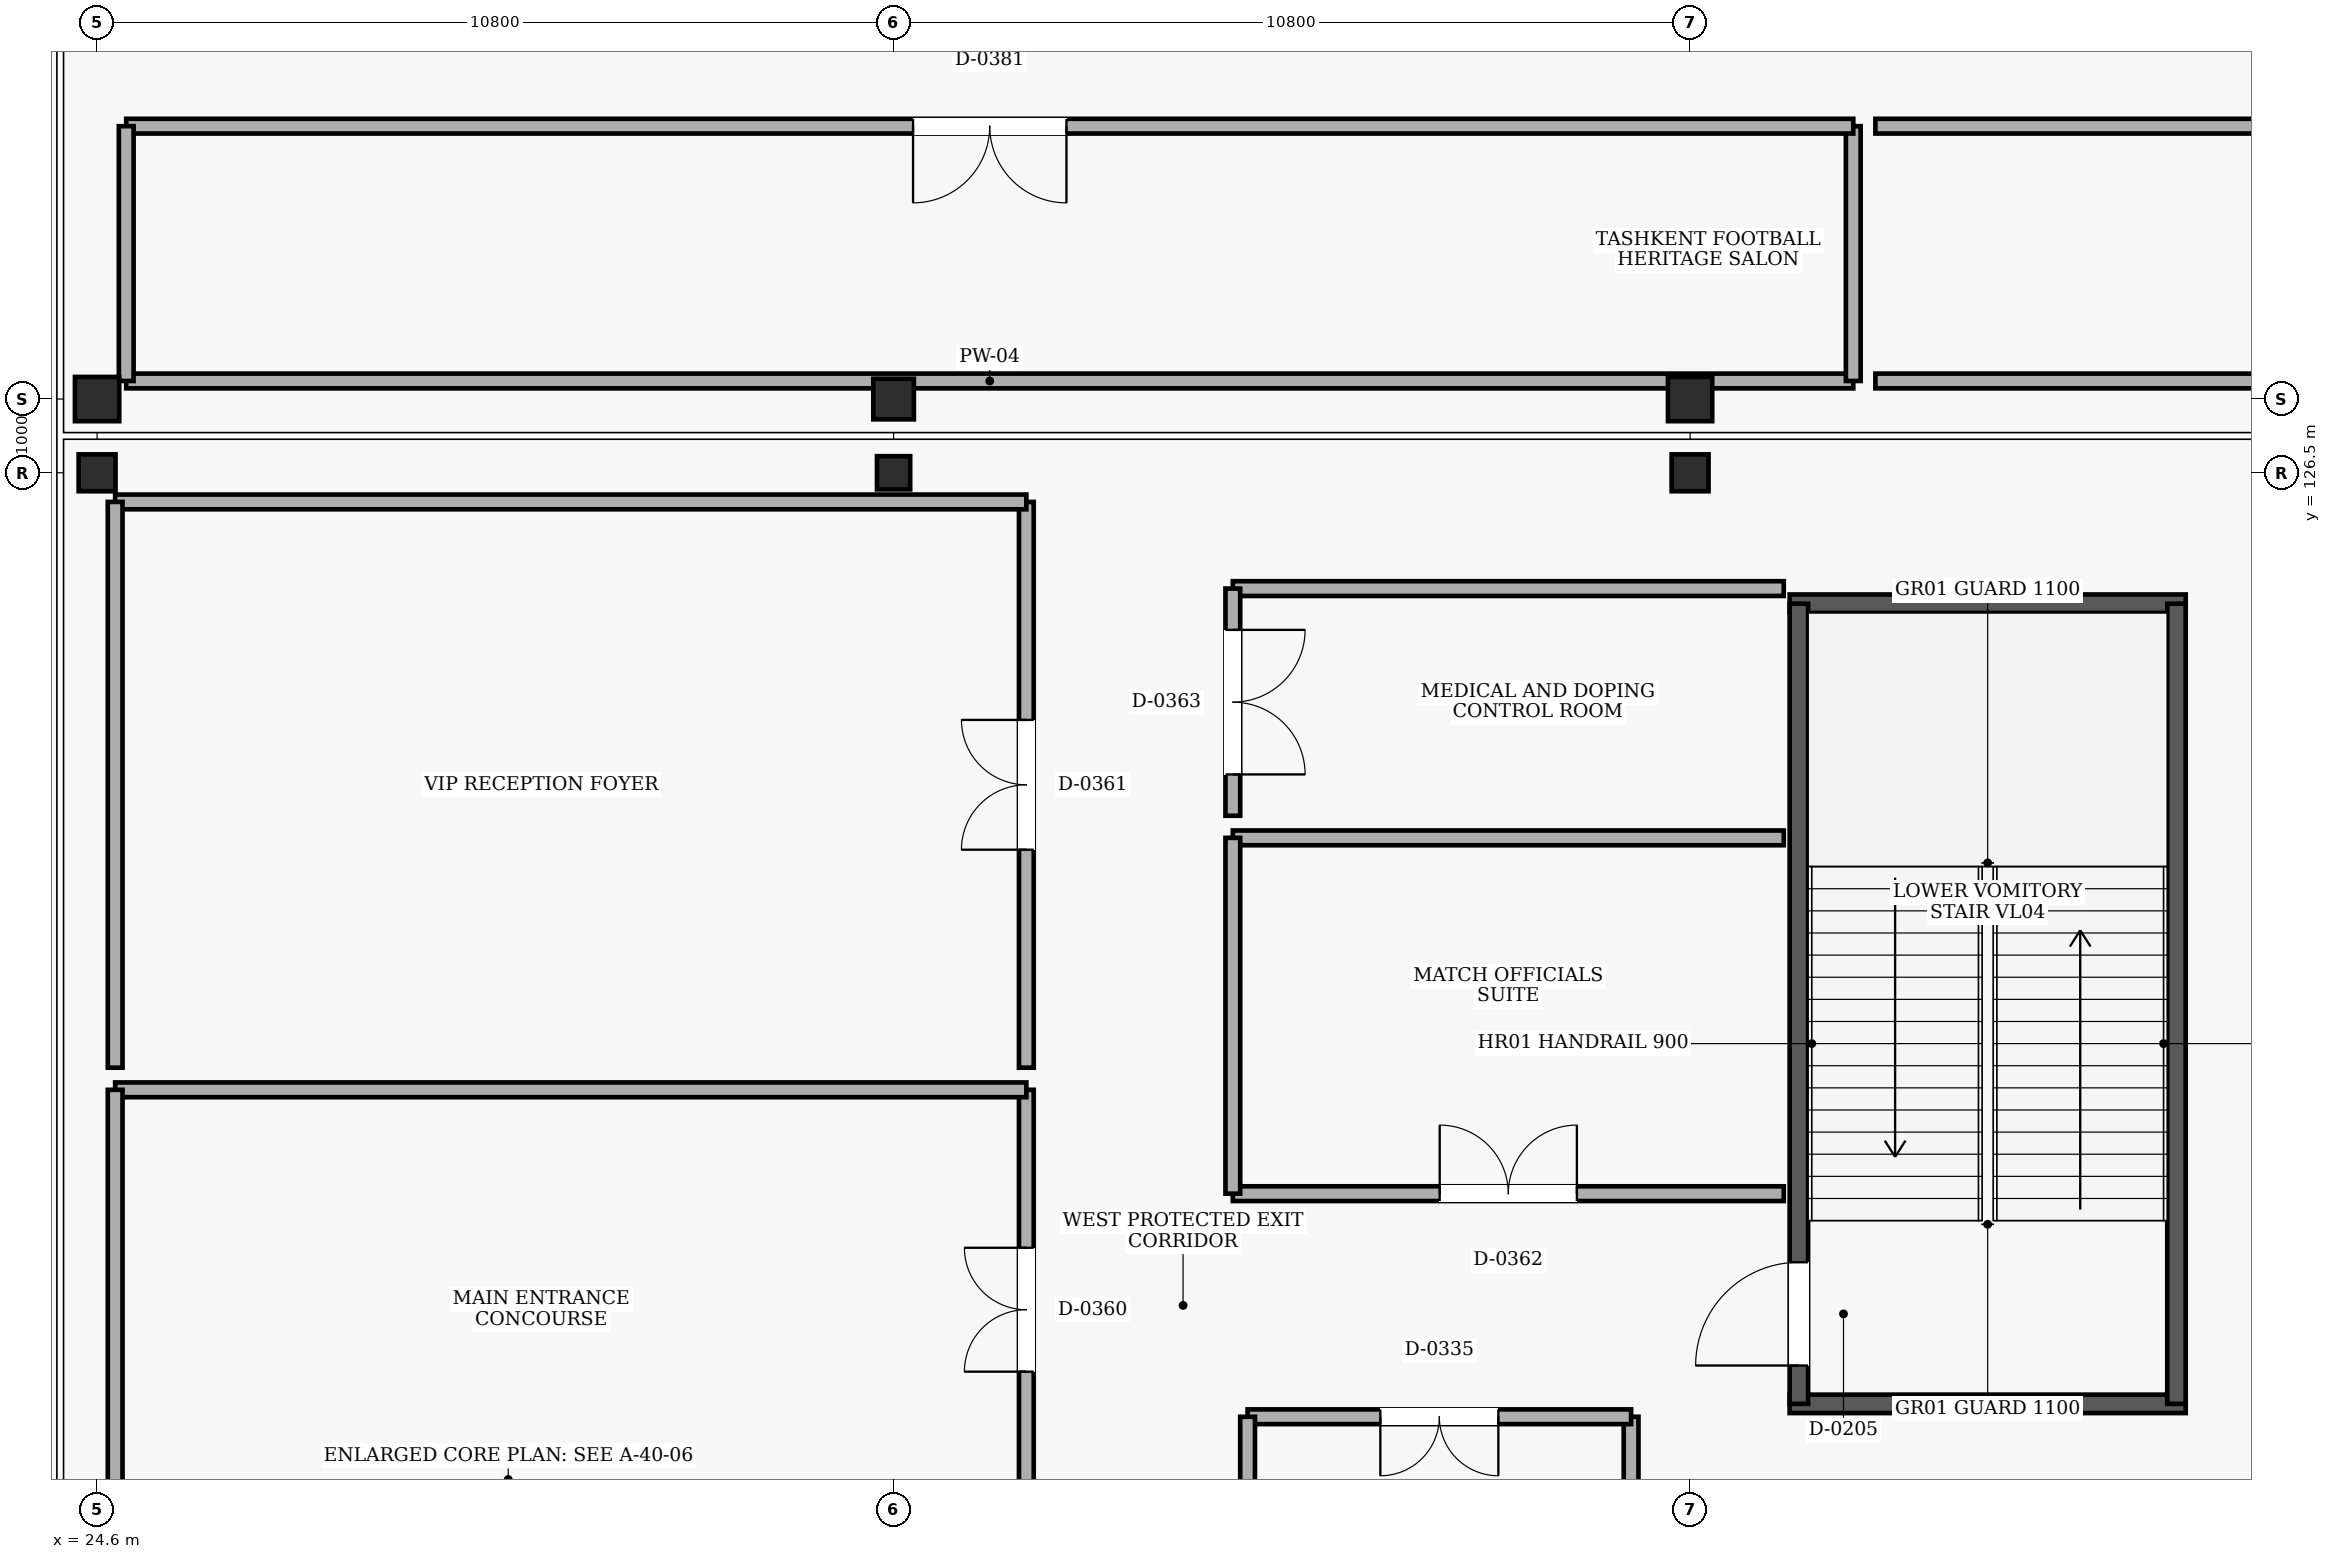
"""IFC4 building model, lengths in metres.
Left out: names, types, materials, properties, quantities, classifications, styles, units other than length and angle.
Written with IfcOpenShell. Run it as: python <this file> out.ifc"""

import sys

from ifc_helpers import new_model, si_unit, direction, frame, frame_2d, origin, origin_2d, place, context, subcontext, project, spatial, rectangle, extrude, element, fill, save


model = new_model("IFC4")
c1 = context("Model", 3, precision=1e-05, world=origin(), true_north=direction((0.0, 1.0)))
c2 = subcontext(c1, "Body", "Model", "MODEL_VIEW")
j1 = project(units=[si_unit("LENGTHUNIT", "METRE"), si_unit("PLANEANGLEUNIT", "RADIAN")], contexts=[c1])
p1 = place(None, origin())
s1 = spatial("IfcSite", under=j1, at=p1, CompositionType="ELEMENT")
p2 = place(p1, origin())
s2 = spatial("IfcBuilding", under=s1, at=p2, CompositionType="ELEMENT")
p3 = place(p2, origin())
s3 = spatial("IfcBuildingStorey", under=s2, at=p3, CompositionType="ELEMENT", Elevation=0.0)
p4 = place(p3, frame((24.6, 126.5, 0.0), z_axis=(0.0, 0.0, 1.0), x_axis=(1.0, 0.0, 0.0)))
e1 = element("IfcColumn", 1, at=p4, inside=s3, PredefinedType="COLUMN", context=c2, shape_type="SweptSolid", body=[
    extrude(rectangle(XDim=0.5, YDim=0.5, at=origin_2d()), origin(), (0.0, 0.0, 1.0), 5.4),
])
p5 = place(p3, frame((24.6, 127.5, 0.0), z_axis=(0.0, 0.0, 1.0), x_axis=(1.0, 0.0, 0.0)))
e2 = element("IfcColumn", 2, at=p5, inside=s3, PredefinedType="COLUMN", context=c2, shape_type="SweptSolid", body=[
    extrude(rectangle(XDim=0.6, YDim=0.6, at=origin_2d()), origin(), (0.0, 0.0, 1.0), 5.4),
])
p6 = place(p3, frame((35.4, 126.5, 0.0), z_axis=(0.0, 0.0, 1.0), x_axis=(1.0, 0.0, 0.0)))
e3 = element("IfcColumn", 3, at=p6, inside=s3, PredefinedType="COLUMN", context=c2, shape_type="SweptSolid", body=[
    extrude(rectangle(XDim=0.45, YDim=0.45, at=origin_2d()), origin(), (0.0, 0.0, 1.0), 5.4),
])
p7 = place(p3, frame((35.4, 127.5, 0.0), z_axis=(0.0, 0.0, 1.0), x_axis=(1.0, 0.0, 0.0)))
e4 = element("IfcColumn", 4, at=p7, inside=s3, PredefinedType="COLUMN", context=c2, shape_type="SweptSolid", body=[
    extrude(rectangle(XDim=0.55, YDim=0.55, at=origin_2d()), origin(), (0.0, 0.0, 1.0), 5.4),
])
p8 = place(p3, frame((46.2, 126.5, 0.0), z_axis=(0.0, 0.0, 1.0), x_axis=(1.0, 0.0, 0.0)))
e5 = element("IfcColumn", 5, at=p8, inside=s3, PredefinedType="COLUMN", context=c2, shape_type="SweptSolid", body=[
    extrude(rectangle(XDim=0.5, YDim=0.5, at=origin_2d()), origin(), (0.0, 0.0, 1.0), 5.4),
])
p9 = place(p3, frame((46.2, 127.5, 0.0), z_axis=(0.0, 0.0, 1.0), x_axis=(1.0, 0.0, 0.0)))
e6 = element("IfcColumn", 6, at=p9, inside=s3, PredefinedType="COLUMN", context=c2, shape_type="SweptSolid", body=[
    extrude(rectangle(XDim=0.6, YDim=0.6, at=origin_2d()), origin(), (0.0, 0.0, 1.0), 5.4),
])
for number, where, z_axis, x_axis in (
    (7, (47.55, 113.875, 0.0), (0.0, 0.0, 1.0), (1.0, 0.0, 0.0)),
    (8, (52.92, 124.725, 0.0), (0.0, 0.0, 1.0), (-1.0, 0.0, 0.0)),
):
    element("IfcWall", number, at=place(p3, frame(where, z_axis=z_axis, x_axis=x_axis)), inside=s3, PredefinedType="SHEAR", context=c2, shape_type="SweptSolid", body=[
        extrude(rectangle(XDim=5.37, YDim=0.25, at=frame_2d((2.685, 0.0))), origin(), (0.0, 0.0, 1.0), 5.08),
    ])
p10 = place(p3, frame((47.675, 113.875, 0.0), z_axis=(0.0, 0.0, 1.0), x_axis=(0.0, 1.0, 0.0)))
e9 = element("IfcWall", 9, at=p10, inside=s3, PredefinedType="SHEAR", context=c2, shape_type="SweptSolid", body=[
    extrude(rectangle(XDim=10.85, YDim=0.25, at=frame_2d((5.425, 0.0))), origin(), (0.0, 0.0, 1.0), 5.08),
])
p11 = place(p10, frame((0.52, 0.0, 0.0)))
e10 = element("IfcOpeningElement", 10, at=p11, cuts=e9, PredefinedType="OPENING", context=c2, shape_type="SweptSolid", body=[
    extrude(rectangle(XDim=1.4, YDim=2.15, at=frame_2d((0.7, 1.075))), frame((0.0, 0.135, 0.0), z_axis=(0.0, -1.0, 0.0), x_axis=(1.0, 0.0, 0.0)), (0.0, 0.0, 1.0), 0.27),
])
p12 = place(p3, frame((52.795, 113.875, 0.0), z_axis=(0.0, 0.0, 1.0), x_axis=(0.0, 1.0, 0.0)))
e11 = element("IfcWall", 11, at=p12, inside=s3, PredefinedType="SHEAR", context=c2, shape_type="SweptSolid", body=[
    extrude(rectangle(XDim=10.85, YDim=0.25, at=frame_2d((5.425, 0.0))), origin(), (0.0, 0.0, 1.0), 5.08),
])
p13 = place(p3, frame((45.4, 110.6, 0.0), z_axis=(0.0, 0.0, 1.0), x_axis=(0.0, 1.0, 0.0)))
e12 = element("IfcWall", 12, at=p13, inside=s3, PredefinedType="PARTITIONING", context=c2, shape_type="SweptSolid", body=[
    extrude(rectangle(XDim=3.1, YDim=0.2, at=frame_2d((1.55, 0.0))), origin(), (0.0, 0.0, 1.0), 5.08),
])
p14 = place(p3, frame((45.4, 113.7, 0.0), z_axis=(0.0, 0.0, 1.0), x_axis=(-1.0, 0.0, 0.0)))
e13 = element("IfcWall", 13, at=p14, inside=s3, PredefinedType="PARTITIONING", context=c2, shape_type="SweptSolid", body=[
    extrude(rectangle(XDim=5.2, YDim=0.2, at=frame_2d((2.6, 0.0))), origin(), (0.0, 0.0, 1.0), 5.08),
])
p15 = place(p14, frame((1.8, 0.0, 0.0)))
e14 = element("IfcOpeningElement", 14, at=p15, cuts=e13, PredefinedType="OPENING", context=c2, shape_type="SweptSolid", body=[
    extrude(rectangle(XDim=1.6, YDim=2.2, at=frame_2d((0.8, 1.1))), frame((0.0, 0.11, 0.0), z_axis=(0.0, -1.0, 0.0), x_axis=(1.0, 0.0, 0.0)), (0.0, 0.0, 1.0), 0.22),
])
p16 = place(p3, frame((40.2, 113.7, 0.0), z_axis=(0.0, 0.0, 1.0), x_axis=(0.0, -1.0, 0.0)))
e15 = element("IfcWall", 15, at=p16, inside=s3, PredefinedType="PARTITIONING", context=c2, shape_type="SweptSolid", body=[
    extrude(rectangle(XDim=3.1, YDim=0.2, at=frame_2d((1.55, 0.0))), origin(), (0.0, 0.0, 1.0), 5.08),
])
p17 = place(p3, frame((37.2, 112.17, 0.0), z_axis=(0.0, 0.0, 1.0), x_axis=(0.0, 1.0, 0.0)))
e16 = element("IfcWall", 16, at=p17, inside=s3, PredefinedType="PARTITIONING", context=c2, shape_type="SweptSolid", body=[
    extrude(rectangle(XDim=5.963, YDim=0.2, at=frame_2d((2.982, 0.0))), origin(), (0.0, 0.0, 1.0), 5.08),
])
p18 = place(p17, frame((2.142, 0.0, 0.0)))
e17 = element("IfcOpeningElement", 17, at=p18, cuts=e16, PredefinedType="OPENING", context=c2, shape_type="SweptSolid", body=[
    extrude(rectangle(XDim=1.68, YDim=2.25, at=frame_2d((0.84, 1.125))), frame((0.0, 0.11, 0.0), z_axis=(0.0, -1.0, 0.0), x_axis=(1.0, 0.0, 0.0)), (0.0, 0.0, 1.0), 0.22),
])
p19 = place(p3, frame((37.2, 118.133, 0.0), z_axis=(0.0, 0.0, 1.0), x_axis=(-1.0, 0.0, 0.0)))
e18 = element("IfcWall", 18, at=p19, inside=s3, PredefinedType="PARTITIONING", context=c2, shape_type="SweptSolid", body=[
    extrude(rectangle(XDim=12.355, YDim=0.2, at=frame_2d((6.177, 0.0))), origin(), (0.0, 0.0, 1.0), 5.08),
])
p20 = place(p3, frame((24.845, 118.133, 0.0), z_axis=(0.0, 0.0, 1.0), x_axis=(0.0, -1.0, 0.0)))
e19 = element("IfcWall", 19, at=p20, inside=s3, PredefinedType="PARTITIONING", context=c2, shape_type="SweptSolid", body=[
    extrude(rectangle(XDim=5.963, YDim=0.2, at=frame_2d((2.982, 0.0))), origin(), (0.0, 0.0, 1.0), 4.16),
])
p21 = place(p3, frame((37.2, 118.433, 0.0), z_axis=(0.0, 0.0, 1.0), x_axis=(0.0, 1.0, 0.0)))
e20 = element("IfcWall", 20, at=p21, inside=s3, PredefinedType="PARTITIONING", context=c2, shape_type="SweptSolid", body=[
    extrude(rectangle(XDim=7.672, YDim=0.2, at=frame_2d((3.836, 0.0))), origin(), (0.0, 0.0, 1.0), 5.08),
])
p22 = place(p21, frame((2.956, 0.0, 0.0)))
e21 = element("IfcOpeningElement", 21, at=p22, cuts=e20, PredefinedType="OPENING", context=c2, shape_type="SweptSolid", body=[
    extrude(rectangle(XDim=1.76, YDim=2.25, at=frame_2d((0.88, 1.125))), frame((0.0, 0.11, 0.0), z_axis=(0.0, -1.0, 0.0), x_axis=(1.0, 0.0, 0.0)), (0.0, 0.0, 1.0), 0.22),
])
p23 = place(p3, frame((37.2, 126.105, 0.0), z_axis=(0.0, 0.0, 1.0), x_axis=(-1.0, 0.0, 0.0)))
e22 = element("IfcWall", 22, at=p23, inside=s3, PredefinedType="PARTITIONING", context=c2, shape_type="SweptSolid", body=[
    extrude(rectangle(XDim=12.355, YDim=0.2, at=frame_2d((6.177, 0.0))), origin(), (0.0, 0.0, 1.0), 4.26),
])
p24 = place(p3, frame((24.845, 126.105, 0.0), z_axis=(0.0, 0.0, 1.0), x_axis=(0.0, -1.0, 0.0)))
e23 = element("IfcWall", 23, at=p24, inside=s3, PredefinedType="PARTITIONING", context=c2, shape_type="SweptSolid", body=[
    extrude(rectangle(XDim=7.672, YDim=0.2, at=frame_2d((3.836, 0.0))), origin(), (0.0, 0.0, 1.0), 4.16),
])
p25 = place(p3, frame((40.0, 116.725, 0.0), z_axis=(0.0, 0.0, 1.0), x_axis=(1.0, 0.0, 0.0)))
e24 = element("IfcWall", 24, at=p25, inside=s3, PredefinedType="PARTITIONING", context=c2, shape_type="SweptSolid", body=[
    extrude(rectangle(XDim=7.47, YDim=0.2, at=frame_2d((3.735, 0.0))), origin(), (0.0, 0.0, 1.0), 5.08),
])
p26 = place(p25, frame((2.805, 0.0, 0.0)))
e25 = element("IfcOpeningElement", 25, at=p26, cuts=e24, PredefinedType="OPENING", context=c2, shape_type="SweptSolid", body=[
    extrude(rectangle(XDim=1.86, YDim=2.3, at=frame_2d((0.93, 1.15))), frame((0.0, 0.11, 0.0), z_axis=(0.0, -1.0, 0.0), x_axis=(1.0, 0.0, 0.0)), (0.0, 0.0, 1.0), 0.22),
])
p27 = place(p3, frame((47.47, 121.55, 0.0), z_axis=(0.0, 0.0, 1.0), x_axis=(-1.0, 0.0, 0.0)))
e26 = element("IfcWall", 26, at=p27, inside=s3, PredefinedType="PARTITIONING", context=c2, shape_type="SweptSolid", body=[
    extrude(rectangle(XDim=7.47, YDim=0.2, at=frame_2d((3.735, 0.0))), origin(), (0.0, 0.0, 1.0), 5.08),
])
p28 = place(p3, frame((40.0, 121.55, 0.0), z_axis=(0.0, 0.0, 1.0), x_axis=(0.0, -1.0, 0.0)))
e27 = element("IfcWall", 27, at=p28, inside=s3, PredefinedType="PARTITIONING", context=c2, shape_type="SweptSolid", body=[
    extrude(rectangle(XDim=4.825, YDim=0.2, at=frame_2d((2.412, 0.0))), origin(), (0.0, 0.0, 1.0), 5.08),
])
p29 = place(p3, frame((47.47, 124.93, 0.0), z_axis=(0.0, 0.0, 1.0), x_axis=(-1.0, 0.0, 0.0)))
e28 = element("IfcWall", 28, at=p29, inside=s3, PredefinedType="PARTITIONING", context=c2, shape_type="SweptSolid", body=[
    extrude(rectangle(XDim=7.47, YDim=0.2, at=frame_2d((3.735, 0.0))), origin(), (0.0, 0.0, 1.0), 5.08),
])
p30 = place(p3, frame((40.0, 124.93, 0.0), z_axis=(0.0, 0.0, 1.0), x_axis=(0.0, -1.0, 0.0)))
e29 = element("IfcWall", 29, at=p30, inside=s3, PredefinedType="PARTITIONING", context=c2, shape_type="SweptSolid", body=[
    extrude(rectangle(XDim=3.08, YDim=0.2, at=frame_2d((1.54, 0.0))), origin(), (0.0, 0.0, 1.0), 5.08),
])
p31 = place(p30, frame((0.56, 0.0, 0.0)))
e30 = element("IfcOpeningElement", 30, at=p31, cuts=e29, PredefinedType="OPENING", context=c2, shape_type="SweptSolid", body=[
    extrude(rectangle(XDim=1.96, YDim=2.3, at=frame_2d((0.98, 1.15))), frame((0.0, 0.11, 0.0), z_axis=(0.0, -1.0, 0.0), x_axis=(1.0, 0.0, 0.0)), (0.0, 0.0, 1.0), 0.22),
])
p32 = place(p3, frame((24.995, 127.745, 0.0), z_axis=(0.0, 0.0, 1.0), x_axis=(1.0, 0.0, 0.0)))
e31 = element("IfcWall", 31, at=p32, inside=s3, PredefinedType="PARTITIONING", context=c2, shape_type="SweptSolid", body=[
    extrude(rectangle(XDim=23.417, YDim=0.2, at=frame_2d((11.709, 0.0))), origin(), (0.0, 0.0, 1.0), 4.26),
])
p33 = place(p3, frame((48.413, 127.745, 0.0), z_axis=(0.0, 0.0, 1.0), x_axis=(0.0, 1.0, 0.0)))
e32 = element("IfcWall", 32, at=p33, inside=s3, PredefinedType="PARTITIONING", context=c2, shape_type="SweptSolid", body=[
    extrude(rectangle(XDim=3.455, YDim=0.2, at=frame_2d((1.728, 0.0))), origin(), (0.0, 0.0, 1.0), 5.08),
])
p34 = place(p3, frame((48.413, 131.2, 0.0), z_axis=(0.0, 0.0, 1.0), x_axis=(-1.0, 0.0, 0.0)))
e33 = element("IfcWall", 33, at=p34, inside=s3, PredefinedType="PARTITIONING", context=c2, shape_type="SweptSolid", body=[
    extrude(rectangle(XDim=23.417, YDim=0.2, at=frame_2d((11.709, 0.0))), origin(), (0.0, 0.0, 1.0), 5.08),
])
p35 = place(p34, frame((10.669, 0.0, 0.0)))
e34 = element("IfcOpeningElement", 34, at=p35, cuts=e33, PredefinedType="OPENING", context=c2, shape_type="SweptSolid", body=[
    extrude(rectangle(XDim=2.08, YDim=2.35, at=frame_2d((1.04, 1.175))), frame((0.0, 0.11, 0.0), z_axis=(0.0, -1.0, 0.0), x_axis=(1.0, 0.0, 0.0)), (0.0, 0.0, 1.0), 0.22),
])
p36 = place(p3, frame((24.995, 131.2, 0.0), z_axis=(0.0, 0.0, 1.0), x_axis=(0.0, -1.0, 0.0)))
e35 = element("IfcWall", 35, at=p36, inside=s3, PredefinedType="PARTITIONING", context=c2, shape_type="SweptSolid", body=[
    extrude(rectangle(XDim=3.455, YDim=0.2, at=frame_2d((1.728, 0.0))), origin(), (0.0, 0.0, 1.0), 4.46),
])
p37 = place(p3, frame((48.712, 127.745, 0.0), z_axis=(0.0, 0.0, 1.0), x_axis=(1.0, 0.0, 0.0)))
e36 = element("IfcWall", 36, at=p37, inside=s3, PredefinedType="PARTITIONING", context=c2, shape_type="SweptSolid", body=[
    extrude(rectangle(XDim=23.417, YDim=0.2, at=frame_2d((11.709, 0.0))), origin(), (0.0, 0.0, 1.0), 4.21),
])
p38 = place(p3, frame((72.13, 131.2, 0.0), z_axis=(0.0, 0.0, 1.0), x_axis=(-1.0, 0.0, 0.0)))
e37 = element("IfcWall", 37, at=p38, inside=s3, PredefinedType="PARTITIONING", context=c2, shape_type="SweptSolid", body=[
    extrude(rectangle(XDim=23.417, YDim=0.2, at=frame_2d((11.709, 0.0))), origin(), (0.0, 0.0, 1.0), 5.08),
])
p39 = place(p38, frame((10.629, 0.0, 0.0)))
e38 = element("IfcOpeningElement", 38, at=p39, cuts=e37, PredefinedType="OPENING", context=c2, shape_type="SweptSolid", body=[
    extrude(rectangle(XDim=2.16, YDim=2.35, at=frame_2d((1.08, 1.175))), frame((0.0, 0.11, 0.0), z_axis=(0.0, -1.0, 0.0), x_axis=(1.0, 0.0, 0.0)), (0.0, 0.0, 1.0), 0.22),
])
p40 = place(p11, origin())
e39 = element("IfcDoor", 39, at=p40, inside=s3, OperationType="SINGLE_SWING_LEFT", PredefinedType="DOOR", context=c2, shape_type="SweptSolid", body=[
    extrude(rectangle(XDim=1.4, YDim=2.15, at=frame_2d((0.7, 1.075))), frame((0.0, 0.025, 0.0), z_axis=(0.0, -1.0, 0.0), x_axis=(1.0, 0.0, 0.0)), (0.0, 0.0, 1.0), 0.05),
])
fill(e10, e39)
p41 = place(p15, origin())
e40 = element("IfcDoor", 40, at=p41, inside=s3, OperationType="DOUBLE_DOOR_SINGLE_SWING", PredefinedType="DOOR", context=c2, shape_type="SweptSolid", body=[
    extrude(rectangle(XDim=1.6, YDim=2.2, at=frame_2d((0.8, 1.1))), frame((0.0, 0.025, 0.0), z_axis=(0.0, -1.0, 0.0), x_axis=(1.0, 0.0, 0.0)), (0.0, 0.0, 1.0), 0.05),
])
fill(e14, e40)
p42 = place(p18, origin())
e41 = element("IfcDoor", 41, at=p42, inside=s3, OperationType="DOUBLE_DOOR_SINGLE_SWING", PredefinedType="DOOR", context=c2, shape_type="SweptSolid", body=[
    extrude(rectangle(XDim=1.68, YDim=2.25, at=frame_2d((0.84, 1.125))), frame((0.0, 0.025, 0.0), z_axis=(0.0, -1.0, 0.0), x_axis=(1.0, 0.0, 0.0)), (0.0, 0.0, 1.0), 0.05),
])
fill(e17, e41)
p43 = place(p22, origin())
e42 = element("IfcDoor", 42, at=p43, inside=s3, OperationType="DOUBLE_DOOR_SINGLE_SWING", PredefinedType="DOOR", context=c2, shape_type="SweptSolid", body=[
    extrude(rectangle(XDim=1.76, YDim=2.25, at=frame_2d((0.88, 1.125))), frame((0.0, 0.025, 0.0), z_axis=(0.0, -1.0, 0.0), x_axis=(1.0, 0.0, 0.0)), (0.0, 0.0, 1.0), 0.05),
])
fill(e21, e42)
p44 = place(p26, origin())
e43 = element("IfcDoor", 43, at=p44, inside=s3, OperationType="DOUBLE_DOOR_SINGLE_SWING", PredefinedType="DOOR", context=c2, shape_type="SweptSolid", body=[
    extrude(rectangle(XDim=1.86, YDim=2.3, at=frame_2d((0.93, 1.15))), frame((0.0, 0.025, 0.0), z_axis=(0.0, -1.0, 0.0), x_axis=(1.0, 0.0, 0.0)), (0.0, 0.0, 1.0), 0.05),
])
fill(e25, e43)
p45 = place(p31, origin())
e44 = element("IfcDoor", 44, at=p45, inside=s3, OperationType="DOUBLE_DOOR_SINGLE_SWING", PredefinedType="DOOR", context=c2, shape_type="SweptSolid", body=[
    extrude(rectangle(XDim=1.96, YDim=2.3, at=frame_2d((0.98, 1.15))), frame((0.0, 0.025, 0.0), z_axis=(0.0, -1.0, 0.0), x_axis=(1.0, 0.0, 0.0)), (0.0, 0.0, 1.0), 0.05),
])
fill(e30, e44)
p46 = place(p35, origin())
e45 = element("IfcDoor", 45, at=p46, inside=s3, OperationType="DOUBLE_DOOR_SINGLE_SWING", PredefinedType="DOOR", context=c2, shape_type="SweptSolid", body=[
    extrude(rectangle(XDim=2.08, YDim=2.35, at=frame_2d((1.04, 1.175))), frame((0.0, 0.025, 0.0), z_axis=(0.0, -1.0, 0.0), x_axis=(1.0, 0.0, 0.0)), (0.0, 0.0, 1.0), 0.05),
])
fill(e34, e45)
save(model, sys.argv[1])
